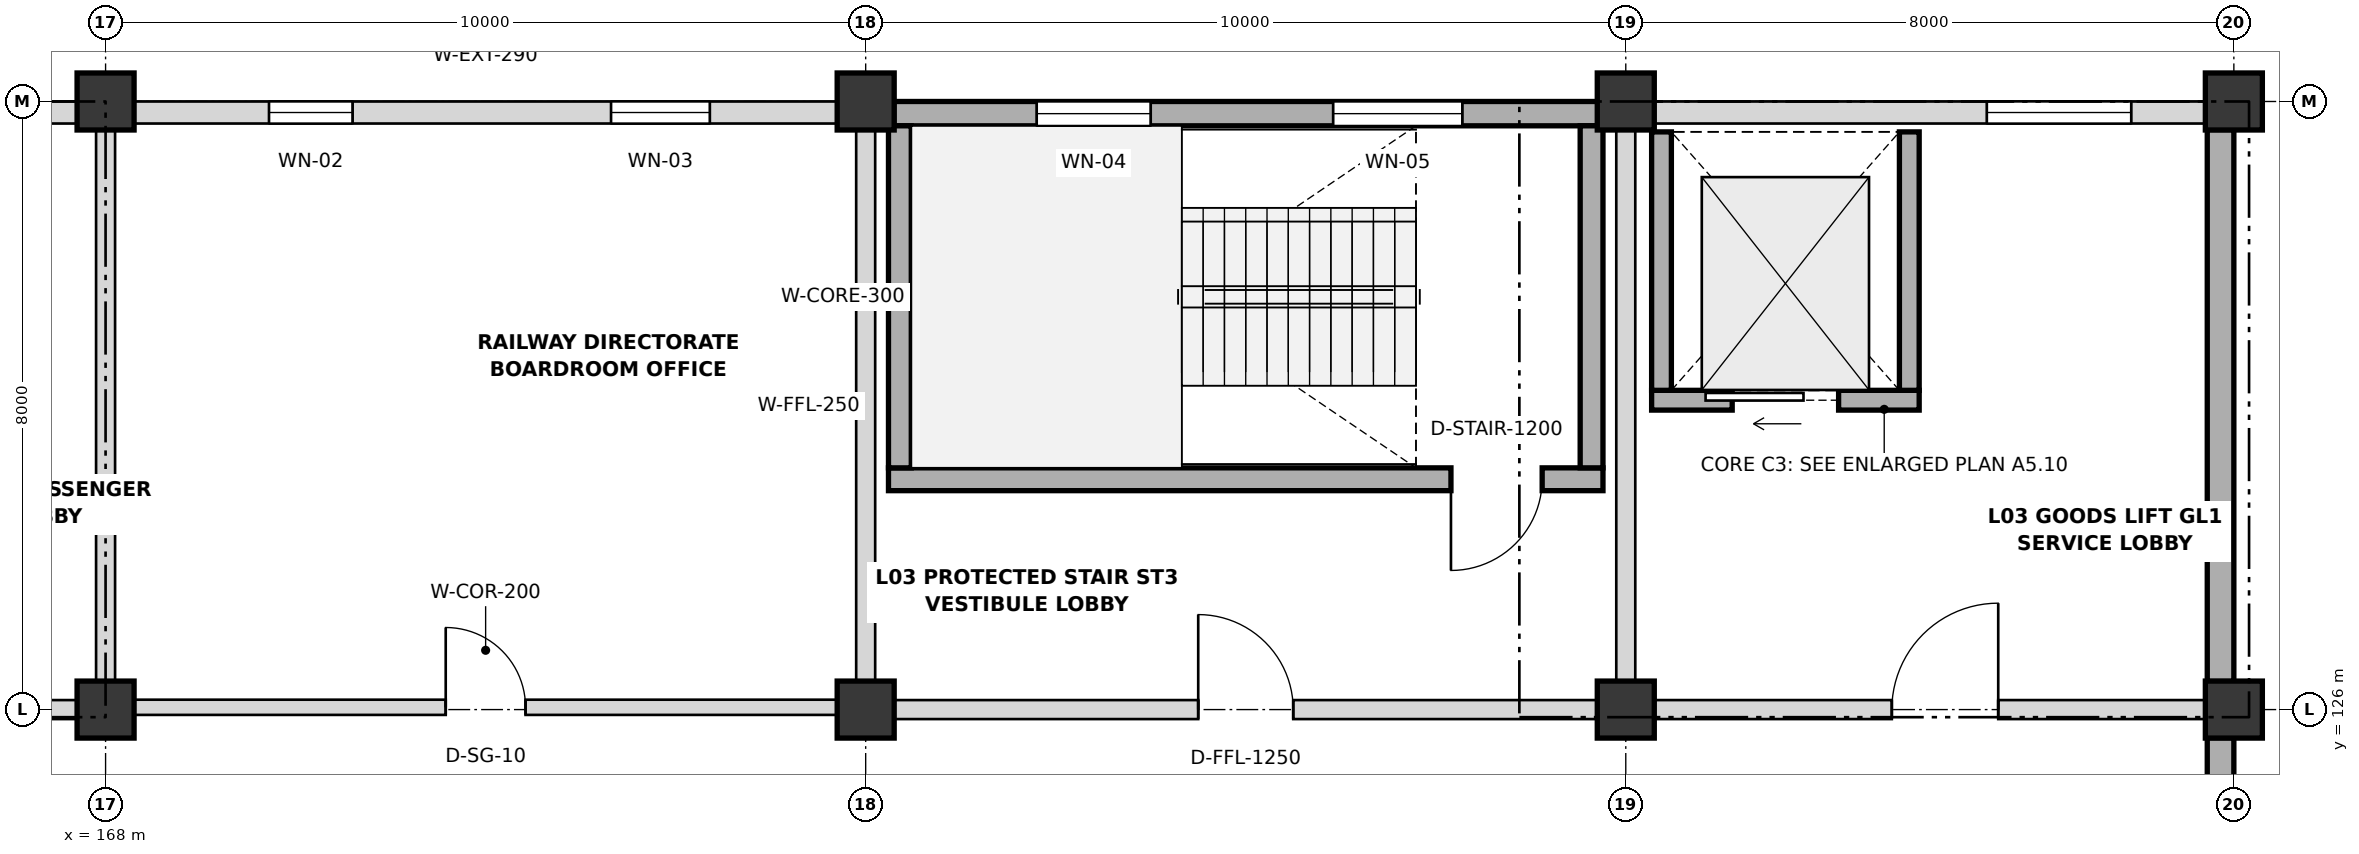
"""IFC4 building model, lengths in metres.
Left out: names, types, materials, properties, quantities, classifications, styles, units other than length and angle.
Written with IfcOpenShell. Run it as: python <this file> out.ifc"""

import sys

from ifc_helpers import new_model, si_unit, direction, frame, frame_2d, origin, origin_2d, place, context, subcontext, project, spatial, rectangle, extrude, element, fill, save


model = new_model("IFC4")
c1 = context("Model", 3, precision=1e-05, world=origin(), true_north=direction((0.0, 1.0)))
c2 = subcontext(c1, "Body", "Model", "MODEL_VIEW")
j1 = project(units=[si_unit("LENGTHUNIT", "METRE"), si_unit("PLANEANGLEUNIT", "RADIAN")], contexts=[c1])
p1 = place(None, origin())
s1 = spatial("IfcSite", under=j1, at=p1, CompositionType="ELEMENT")
p2 = place(p1, origin())
s2 = spatial("IfcBuilding", under=s1, at=p2, CompositionType="ELEMENT")
p3 = place(p2, frame((0.0, 0.0, 14.4)))
s3 = spatial("IfcBuildingStorey", under=s2, at=p3, CompositionType="ELEMENT", Elevation=14.4)
for number, where, z_axis, x_axis in (
    (1, (168.0, 126.0, 0.0), (0.0, 0.0, 1.0), (1.0, 0.0, 0.0)),
    (2, (168.0, 134.0, 0.0), (0.0, 0.0, 1.0), (1.0, 0.0, 0.0)),
    (3, (178.0, 126.0, 0.0), (0.0, 0.0, 1.0), (1.0, 0.0, 0.0)),
    (4, (178.0, 134.0, 0.0), (0.0, 0.0, 1.0), (1.0, 0.0, 0.0)),
    (5, (188.0, 126.0, 0.0), (0.0, 0.0, 1.0), (1.0, 0.0, 0.0)),
    (6, (188.0, 134.0, 0.0), (0.0, 0.0, 1.0), (1.0, 0.0, 0.0)),
    (7, (196.0, 126.0, 0.0), (0.0, 0.0, 1.0), (1.0, 0.0, 0.0)),
    (8, (196.0, 134.0, 0.0), (0.0, 0.0, 1.0), (1.0, 0.0, 0.0)),
):
    element("IfcColumn", number, at=place(p3, frame(where, z_axis=z_axis, x_axis=x_axis)), inside=s3, PredefinedType="COLUMN", context=c2, shape_type="SweptSolid", body=[
        extrude(rectangle(XDim=0.75, YDim=0.75, at=origin_2d()), origin(), (0.0, 0.0, 1.0), 4.2),
    ])
p4 = place(p3, frame((195.825, 125.63, 0.0), z_axis=(0.0, 0.0, 1.0), x_axis=(0.0, -1.0, 0.0)))
e9 = element("IfcWall", 9, at=p4, inside=s3, PredefinedType="SOLIDWALL", context=c2, shape_type="SweptSolid", body=[
    extrude(rectangle(XDim=11.26, YDim=0.35, at=frame_2d((5.63, 0.0))), origin(), (0.0, 0.0, 1.0), 4.2),
])
p5 = place(p3, frame((195.825, 133.63, 0.0), z_axis=(0.0, 0.0, 1.0), x_axis=(0.0, -1.0, 0.0)))
e10 = element("IfcWall", 10, at=p5, inside=s3, PredefinedType="SOLIDWALL", context=c2, shape_type="SweptSolid", body=[
    extrude(rectangle(XDim=7.26, YDim=0.35, at=frame_2d((3.63, 0.0))), origin(), (0.0, 0.0, 1.0), 4.2),
])
p6 = place(p3, frame((158.37, 133.855, 0.0), z_axis=(0.0, 0.0, 1.0), x_axis=(1.0, 0.0, 0.0)))
e11 = element("IfcWall", 11, at=p6, inside=s3, PredefinedType="SOLIDWALL", context=c2, shape_type="SweptSolid", body=[
    extrude(rectangle(XDim=9.26, YDim=0.29, at=frame_2d((4.63, 0.0))), origin(), (0.0, 0.0, 1.0), 3.178),
])
p7 = place(p6, frame((3.38, 0.0, 1.05)))
e12 = element("IfcOpeningElement", 12, at=p7, cuts=e11, PredefinedType="OPENING", context=c2, shape_type="SweptSolid", body=[
    extrude(rectangle(XDim=0.9, YDim=1.15, at=frame_2d((0.45, 0.575))), frame((0.0, 0.155, 0.0), z_axis=(0.0, -1.0, 0.0), x_axis=(1.0, 0.0, 0.0)), (0.0, 0.0, 1.0), 0.31),
])
p8 = place(p3, frame((168.37, 133.855, 0.0), z_axis=(0.0, 0.0, 1.0), x_axis=(1.0, 0.0, 0.0)))
e13 = element("IfcWall", 13, at=p8, inside=s3, PredefinedType="SOLIDWALL", context=c2, shape_type="SweptSolid", body=[
    extrude(rectangle(XDim=9.26, YDim=0.29, at=frame_2d((4.63, 0.0))), origin(), (0.0, 0.0, 1.0), 3.178),
])
p9 = place(p8, frame((1.78, 0.0, 1.05)))
e14 = element("IfcOpeningElement", 14, at=p9, cuts=e13, PredefinedType="OPENING", context=c2, shape_type="SweptSolid", body=[
    extrude(rectangle(XDim=1.1, YDim=1.15, at=frame_2d((0.55, 0.575))), frame((0.0, 0.155, 0.0), z_axis=(0.0, -1.0, 0.0), x_axis=(1.0, 0.0, 0.0)), (0.0, 0.0, 1.0), 0.31),
])
p10 = place(p8, frame((6.28, 0.0, 1.05)))
e15 = element("IfcOpeningElement", 15, at=p10, cuts=e13, PredefinedType="OPENING", context=c2, shape_type="SweptSolid", body=[
    extrude(rectangle(XDim=1.3, YDim=1.15, at=frame_2d((0.65, 0.575))), frame((0.0, 0.155, 0.0), z_axis=(0.0, -1.0, 0.0), x_axis=(1.0, 0.0, 0.0)), (0.0, 0.0, 1.0), 0.31),
])
p11 = place(p3, frame((178.37, 133.84, 0.0), z_axis=(0.0, 0.0, 1.0), x_axis=(1.0, 0.0, 0.0)))
e16 = element("IfcWall", 16, at=p11, inside=s3, PredefinedType="SHEAR", context=c2, shape_type="SweptSolid", body=[
    extrude(rectangle(XDim=9.26, YDim=0.32, at=frame_2d((4.63, 0.0))), origin(), (0.0, 0.0, 1.0), 4.2),
])
p12 = place(p11, frame((1.88, 0.0, 1.05)))
e17 = element("IfcOpeningElement", 17, at=p12, cuts=e16, PredefinedType="OPENING", context=c2, shape_type="SweptSolid", body=[
    extrude(rectangle(XDim=1.5, YDim=1.15, at=frame_2d((0.75, 0.575))), frame((0.0, 0.17, 0.0), z_axis=(0.0, -1.0, 0.0), x_axis=(1.0, 0.0, 0.0)), (0.0, 0.0, 1.0), 0.34),
])
p13 = place(p11, frame((5.78, 0.0, 1.05)))
e18 = element("IfcOpeningElement", 18, at=p13, cuts=e16, PredefinedType="OPENING", context=c2, shape_type="SweptSolid", body=[
    extrude(rectangle(XDim=1.7, YDim=1.15, at=frame_2d((0.85, 0.575))), frame((0.0, 0.17, 0.0), z_axis=(0.0, -1.0, 0.0), x_axis=(1.0, 0.0, 0.0)), (0.0, 0.0, 1.0), 0.34),
])
p14 = place(p3, frame((188.37, 133.855, 0.0), z_axis=(0.0, 0.0, 1.0), x_axis=(1.0, 0.0, 0.0)))
e19 = element("IfcWall", 19, at=p14, inside=s3, PredefinedType="SOLIDWALL", context=c2, shape_type="SweptSolid", body=[
    extrude(rectangle(XDim=7.26, YDim=0.29, at=frame_2d((3.63, 0.0))), origin(), (0.0, 0.0, 1.0), 3.178),
])
p15 = place(p14, frame((4.38, 0.0, 1.05)))
e20 = element("IfcOpeningElement", 20, at=p15, cuts=e19, PredefinedType="OPENING", context=c2, shape_type="SweptSolid", body=[
    extrude(rectangle(XDim=1.9, YDim=1.15, at=frame_2d((0.95, 0.575))), frame((0.0, 0.155, 0.0), z_axis=(0.0, -1.0, 0.0), x_axis=(1.0, 0.0, 0.0)), (0.0, 0.0, 1.0), 0.31),
])
p16 = place(p3, frame((187.7, 129.03, 0.0), z_axis=(0.0, 0.0, 1.0), x_axis=(-1.0, 0.0, 0.0)))
e21 = element("IfcWall", 21, at=p16, inside=s3, PredefinedType="SHEAR", context=c2, shape_type="SweptSolid", body=[
    extrude(rectangle(XDim=9.4, YDim=0.3, at=frame_2d((4.7, 0.0))), origin(), (0.0, 0.0, 1.0), 4.2),
])
p17 = place(p16, frame((0.8, 0.0, 0.0)))
e22 = element("IfcOpeningElement", 22, at=p17, cuts=e21, PredefinedType="OPENING", context=c2, shape_type="SweptSolid", body=[
    extrude(rectangle(XDim=1.2, YDim=2.15, at=frame_2d((0.6, 1.075))), frame((0.0, 0.16, 0.0), z_axis=(0.0, -1.0, 0.0), x_axis=(1.0, 0.0, 0.0)), (0.0, 0.0, 1.0), 0.32),
])
for number, where, z_axis, x_axis in (
    (23, (187.55, 133.68, 0.0), (0.0, 0.0, 1.0), (0.0, -1.0, 0.0)),
    (24, (178.45, 129.18, 0.0), (0.0, 0.0, 1.0), (0.0, 1.0, 0.0)),
):
    element("IfcWall", number, at=place(p3, frame(where, z_axis=z_axis, x_axis=x_axis)), inside=s3, PredefinedType="SHEAR", context=c2, shape_type="SweptSolid", body=[
        extrude(rectangle(XDim=4.5, YDim=0.3, at=frame_2d((2.25, 0.0))), origin(), (0.0, 0.0, 1.0), 4.2),
    ])
p18 = place(p3, frame((188.34, 130.07, 0.0), z_axis=(0.0, 0.0, 1.0), x_axis=(1.0, 0.0, 0.0)))
e25 = element("IfcWall", 25, at=p18, inside=s3, PredefinedType="SHEAR", context=c2, shape_type="SweptSolid", body=[
    extrude(rectangle(XDim=3.52, YDim=0.26, at=frame_2d((1.76, 0.0))), origin(), (0.0, 0.0, 1.0), 4.2),
])
p19 = place(p18, frame((1.06, 0.0, 0.0)))
e26 = element("IfcOpeningElement", 26, at=p19, cuts=e25, PredefinedType="OPENING", context=c2, shape_type="SweptSolid", body=[
    extrude(rectangle(XDim=1.4, YDim=2.2, at=frame_2d((0.7, 1.1))), frame((0.0, 0.14, 0.0), z_axis=(0.0, -1.0, 0.0), x_axis=(1.0, 0.0, 0.0)), (0.0, 0.0, 1.0), 0.28),
])
for number, where, z_axis, x_axis in (
    (27, (188.47, 130.2, 0.0), (0.0, 0.0, 1.0), (0.0, 1.0, 0.0)),
    (28, (191.73, 130.2, 0.0), (0.0, 0.0, 1.0), (0.0, 1.0, 0.0)),
):
    element("IfcWall", number, at=place(p3, frame(where, z_axis=z_axis, x_axis=x_axis)), inside=s3, PredefinedType="SHEAR", context=c2, shape_type="SweptSolid", body=[
        extrude(rectangle(XDim=3.4, YDim=0.26, at=frame_2d((1.7, 0.0))), origin(), (0.0, 0.0, 1.0), 4.2),
    ])
p20 = place(p3, frame((158.38, 126.0, 0.0), z_axis=(0.0, 0.0, 1.0), x_axis=(1.0, 0.0, 0.0)))
e29 = element("IfcWall", 29, at=p20, inside=s3, PredefinedType="PARTITIONING", context=c2, shape_type="SweptSolid", body=[
    extrude(rectangle(XDim=9.24, YDim=0.25, at=frame_2d((4.62, 0.0))), origin(), (0.0, 0.0, 1.0), 3.078),
])
p21 = place(p20, frame((1.795, 0.0, 0.0)))
e30 = element("IfcOpeningElement", 30, at=p21, cuts=e29, PredefinedType="OPENING", context=c2, shape_type="SweptSolid", body=[
    extrude(rectangle(XDim=1.25, YDim=2.15, at=frame_2d((0.625, 1.075))), frame((0.0, 0.135, 0.0), z_axis=(0.0, -1.0, 0.0), x_axis=(1.0, 0.0, 0.0)), (0.0, 0.0, 1.0), 0.27),
])
p22 = place(p20, frame((6.27, 0.0, 0.0)))
e31 = element("IfcOpeningElement", 31, at=p22, cuts=e29, PredefinedType="OPENING", context=c2, shape_type="SweptSolid", body=[
    extrude(rectangle(XDim=1.1, YDim=2.15, at=frame_2d((0.55, 1.075))), frame((0.0, 0.135, 0.0), z_axis=(0.0, -1.0, 0.0), x_axis=(1.0, 0.0, 0.0)), (0.0, 0.0, 1.0), 0.27),
])
p23 = place(p3, frame((178.38, 126.0, 0.0), z_axis=(0.0, 0.0, 1.0), x_axis=(1.0, 0.0, 0.0)))
e32 = element("IfcWall", 32, at=p23, inside=s3, PredefinedType="PARTITIONING", context=c2, shape_type="SweptSolid", body=[
    extrude(rectangle(XDim=9.24, YDim=0.25, at=frame_2d((4.62, 0.0))), origin(), (0.0, 0.0, 1.0), 3.078),
])
p24 = place(p23, frame((3.995, 0.0, 0.0)))
e33 = element("IfcOpeningElement", 33, at=p24, cuts=e32, PredefinedType="OPENING", context=c2, shape_type="SweptSolid", body=[
    extrude(rectangle(XDim=1.25, YDim=2.15, at=frame_2d((0.625, 1.075))), frame((0.0, 0.135, 0.0), z_axis=(0.0, -1.0, 0.0), x_axis=(1.0, 0.0, 0.0)), (0.0, 0.0, 1.0), 0.27),
])
p25 = place(p3, frame((188.38, 126.0, 0.0), z_axis=(0.0, 0.0, 1.0), x_axis=(1.0, 0.0, 0.0)))
e34 = element("IfcWall", 34, at=p25, inside=s3, PredefinedType="PARTITIONING", context=c2, shape_type="SweptSolid", body=[
    extrude(rectangle(XDim=7.24, YDim=0.25, at=frame_2d((3.62, 0.0))), origin(), (0.0, 0.0, 1.0), 3.078),
])
p26 = place(p25, frame((3.12, 0.0, 0.0)))
e35 = element("IfcOpeningElement", 35, at=p26, cuts=e34, PredefinedType="OPENING", context=c2, shape_type="SweptSolid", body=[
    extrude(rectangle(XDim=1.4, YDim=2.2, at=frame_2d((0.7, 1.1))), frame((0.0, 0.135, 0.0), z_axis=(0.0, -1.0, 0.0), x_axis=(1.0, 0.0, 0.0)), (0.0, 0.0, 1.0), 0.27),
])
for number, where, z_axis, x_axis in (
    (36, (168.0, 126.38, 0.0), (0.0, 0.0, 1.0), (0.0, 1.0, 0.0)),
    (37, (178.0, 126.38, 0.0), (0.0, 0.0, 1.0), (0.0, 1.0, 0.0)),
    (38, (188.0, 126.38, 0.0), (0.0, 0.0, 1.0), (0.0, 1.0, 0.0)),
):
    element("IfcWall", number, at=place(p3, frame(where, z_axis=z_axis, x_axis=x_axis)), inside=s3, PredefinedType="PARTITIONING", context=c2, shape_type="SweptSolid", body=[
        extrude(rectangle(XDim=7.24, YDim=0.25, at=frame_2d((3.62, 0.0))), origin(), (0.0, 0.0, 1.0), 3.178),
    ])
p27 = place(p3, frame((168.3, 126.03, 0.0), z_axis=(0.0, 0.0, 1.0), x_axis=(1.0, 0.0, 0.0)))
e39 = element("IfcWall", 39, at=p27, inside=s3, PredefinedType="PARTITIONING", context=c2, shape_type="SweptSolid", body=[
    extrude(rectangle(XDim=9.4, YDim=0.2, at=frame_2d((4.7, 0.0))), origin(), (0.0, 0.0, 1.0), 3.078),
])
p28 = place(p27, frame((4.175, 0.0, 0.0)))
e40 = element("IfcOpeningElement", 40, at=p28, cuts=e39, PredefinedType="OPENING", context=c2, shape_type="SweptSolid", body=[
    extrude(rectangle(XDim=1.05, YDim=2.2, at=frame_2d((0.525, 1.1))), frame((0.0, 0.11, 0.0), z_axis=(0.0, -1.0, 0.0), x_axis=(1.0, 0.0, 0.0)), (0.0, 0.0, 1.0), 0.22),
])
p29 = place(p9, origin())
e41 = element("IfcWindow", 41, at=p29, inside=s3, PartitioningType="SINGLE_PANEL", PredefinedType="WINDOW", context=c2, shape_type="SweptSolid", body=[
    extrude(rectangle(XDim=1.1, YDim=1.15, at=frame_2d((0.55, 0.575))), frame((0.0, 0.03, 0.0), z_axis=(0.0, -1.0, 0.0), x_axis=(1.0, 0.0, 0.0)), (0.0, 0.0, 1.0), 0.06),
])
fill(e14, e41)
p30 = place(p10, origin())
e42 = element("IfcWindow", 42, at=p30, inside=s3, PartitioningType="SINGLE_PANEL", PredefinedType="WINDOW", context=c2, shape_type="SweptSolid", body=[
    extrude(rectangle(XDim=1.3, YDim=1.15, at=frame_2d((0.65, 0.575))), frame((0.0, 0.03, 0.0), z_axis=(0.0, -1.0, 0.0), x_axis=(1.0, 0.0, 0.0)), (0.0, 0.0, 1.0), 0.06),
])
fill(e15, e42)
p31 = place(p12, origin())
e43 = element("IfcWindow", 43, at=p31, inside=s3, PartitioningType="SINGLE_PANEL", PredefinedType="WINDOW", context=c2, shape_type="SweptSolid", body=[
    extrude(rectangle(XDim=1.5, YDim=1.15, at=frame_2d((0.75, 0.575))), frame((0.0, 0.03, 0.0), z_axis=(0.0, -1.0, 0.0), x_axis=(1.0, 0.0, 0.0)), (0.0, 0.0, 1.0), 0.06),
])
fill(e17, e43)
p32 = place(p13, origin())
e44 = element("IfcWindow", 44, at=p32, inside=s3, PartitioningType="SINGLE_PANEL", PredefinedType="WINDOW", context=c2, shape_type="SweptSolid", body=[
    extrude(rectangle(XDim=1.7, YDim=1.15, at=frame_2d((0.85, 0.575))), frame((0.0, 0.03, 0.0), z_axis=(0.0, -1.0, 0.0), x_axis=(1.0, 0.0, 0.0)), (0.0, 0.0, 1.0), 0.06),
])
fill(e18, e44)
p33 = place(p15, origin())
e45 = element("IfcWindow", 45, at=p33, inside=s3, PartitioningType="SINGLE_PANEL", PredefinedType="WINDOW", context=c2, shape_type="SweptSolid", body=[
    extrude(rectangle(XDim=1.9, YDim=1.15, at=frame_2d((0.95, 0.575))), frame((0.0, 0.03, 0.0), z_axis=(0.0, -1.0, 0.0), x_axis=(1.0, 0.0, 0.0)), (0.0, 0.0, 1.0), 0.06),
])
fill(e20, e45)
p34 = place(p17, origin())
e46 = element("IfcDoor", 46, at=p34, inside=s3, OperationType="SINGLE_SWING_RIGHT", PredefinedType="DOOR", context=c2, shape_type="SweptSolid", body=[
    extrude(rectangle(XDim=1.2, YDim=2.15, at=frame_2d((0.6, 1.075))), frame((0.0, 0.025, 0.0), z_axis=(0.0, -1.0, 0.0), x_axis=(1.0, 0.0, 0.0)), (0.0, 0.0, 1.0), 0.05),
])
fill(e22, e46)
p35 = place(p19, origin())
e47 = element("IfcDoor", 47, at=p35, inside=s3, OperationType="SLIDING_TO_LEFT", PredefinedType="DOOR", context=c2, shape_type="SweptSolid", body=[
    extrude(rectangle(XDim=1.4, YDim=2.2, at=frame_2d((0.7, 1.1))), frame((0.0, 0.025, 0.0), z_axis=(0.0, -1.0, 0.0), x_axis=(1.0, 0.0, 0.0)), (0.0, 0.0, 1.0), 0.05),
])
fill(e26, e47)
p36 = place(p24, origin())
e48 = element("IfcDoor", 48, at=p36, inside=s3, OperationType="SINGLE_SWING_LEFT", PredefinedType="DOOR", context=c2, shape_type="SweptSolid", body=[
    extrude(rectangle(XDim=1.25, YDim=2.15, at=frame_2d((0.625, 1.075))), frame((0.0, 0.025, 0.0), z_axis=(0.0, -1.0, 0.0), x_axis=(1.0, 0.0, 0.0)), (0.0, 0.0, 1.0), 0.05),
])
fill(e33, e48)
p37 = place(p26, origin())
e49 = element("IfcDoor", 49, at=p37, inside=s3, OperationType="SINGLE_SWING_RIGHT", PredefinedType="DOOR", context=c2, shape_type="SweptSolid", body=[
    extrude(rectangle(XDim=1.4, YDim=2.2, at=frame_2d((0.7, 1.1))), frame((0.0, 0.025, 0.0), z_axis=(0.0, -1.0, 0.0), x_axis=(1.0, 0.0, 0.0)), (0.0, 0.0, 1.0), 0.05),
])
fill(e35, e49)
p38 = place(p28, origin())
e50 = element("IfcDoor", 50, at=p38, inside=s3, OperationType="SINGLE_SWING_LEFT", PredefinedType="DOOR", context=c2, shape_type="SweptSolid", body=[
    extrude(rectangle(XDim=1.05, YDim=2.2, at=frame_2d((0.525, 1.1))), frame((0.0, 0.025, 0.0), z_axis=(0.0, -1.0, 0.0), x_axis=(1.0, 0.0, 0.0)), (0.0, 0.0, 1.0), 0.05),
])
fill(e40, e50)
save(model, sys.argv[1])
